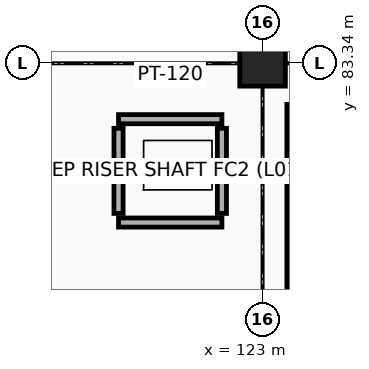
"""IFC4 building model, lengths in metres.
Left out: names, types, materials, properties, quantities, classifications, styles, units other than length and angle.
Written with IfcOpenShell. Run it as: python <this file> out.ifc"""

import sys

from ifc_helpers import new_model, si_unit, direction, frame, frame_2d, origin, origin_2d, place, context, subcontext, project, spatial, rectangle, extrude, element, save


model = new_model("IFC4")
c1 = context("Model", 3, precision=1e-05, world=origin(), true_north=direction((0.0, 1.0)))
c2 = subcontext(c1, "Body", "Model", "MODEL_VIEW")
j1 = project(units=[si_unit("LENGTHUNIT", "METRE"), si_unit("PLANEANGLEUNIT", "RADIAN")], contexts=[c1])
p1 = place(None, origin())
s1 = spatial("IfcSite", under=j1, at=p1, CompositionType="ELEMENT")
p2 = place(p1, origin())
s2 = spatial("IfcBuilding", under=s1, at=p2, CompositionType="ELEMENT")
p3 = place(p2, frame((0.0, 0.0, 5.4)))
s3 = spatial("IfcBuildingStorey", under=s2, at=p3, CompositionType="ELEMENT", Elevation=5.4)
p4 = place(p3, frame((123.0, 83.34, 0.0), z_axis=(0.0, 0.0, 1.0), x_axis=(1.0, 0.0, 0.0)))
e1 = element("IfcColumn", 1, at=p4, inside=s3, PredefinedType="COLUMN", context=c2, shape_type="SweptSolid", body=[
    extrude(rectangle(XDim=0.6, YDim=0.6, at=origin_2d()), origin(), (0.0, 0.0, 1.0), 4.8),
])
for number, where, z_axis, x_axis in (
    (2, (121.105, 81.245, 0.0), (0.0, 0.0, 1.0), (1.0, 0.0, 0.0)),
    (3, (121.105, 82.605, 0.0), (0.0, 0.0, 1.0), (1.0, 0.0, 0.0)),
):
    element("IfcWall", number, at=place(p3, frame(where, z_axis=z_axis, x_axis=x_axis)), inside=s3, PredefinedType="PARTITIONING", context=c2, shape_type="SweptSolid", body=[
        extrude(rectangle(XDim=1.36, YDim=0.12, at=frame_2d((0.68, 0.0))), origin(), (0.0, 0.0, 1.0), 4.505),
    ])
for number, where, z_axis, x_axis in (
    (4, (121.105, 81.365, 0.0), (0.0, 0.0, 1.0), (0.0, 1.0, 0.0)),
    (5, (122.465, 81.365, 0.0), (0.0, 0.0, 1.0), (0.0, 1.0, 0.0)),
):
    element("IfcWall", number, at=place(p3, frame(where, z_axis=z_axis, x_axis=x_axis)), inside=s3, PredefinedType="PARTITIONING", context=c2, shape_type="SweptSolid", body=[
        extrude(rectangle(XDim=1.12, YDim=0.12, at=frame_2d((0.56, 0.0))), origin(), (0.0, 0.0, 1.0), 4.505),
    ])
p5 = place(p3, frame((123.4, 65.4, 0.0), z_axis=(0.0, 0.0, 1.0), x_axis=(0.0, 1.0, 0.0)))
e6 = element("IfcWall", 6, at=p5, inside=s3, PredefinedType="PARTITIONING", context=c2, shape_type="SweptSolid", body=[
    extrude(rectangle(XDim=17.4, YDim=0.16, at=frame_2d((8.7, 0.0))), origin(), (0.0, 0.0, 1.0), 3.687),
])
save(model, sys.argv[1])
